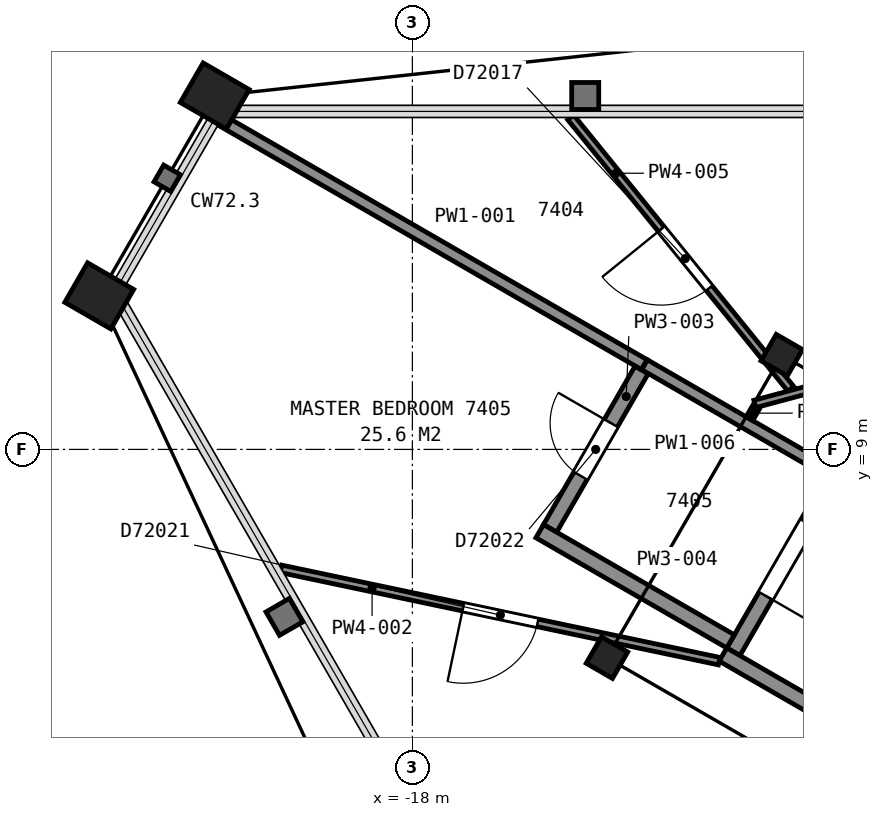
"""IFC4 building model, lengths in metres.
Left out: names, types, materials, properties, quantities, classifications, styles, units other than length and angle.
Written with IfcOpenShell. Run it as: python <this file> out.ifc"""

import sys

from ifc_helpers import new_model, si_unit, direction, frame, frame_2d, origin, origin_2d, place, context, subcontext, project, spatial, rectangle, hollow_rectangle, i_section, extrude, element, fill, save


model = new_model("IFC4")
c1 = context("Model", 3, precision=1e-05, world=origin(), true_north=direction((0.0, 1.0)))
c2 = subcontext(c1, "Body", "Model", "MODEL_VIEW")
j1 = project(units=[si_unit("LENGTHUNIT", "METRE"), si_unit("PLANEANGLEUNIT", "RADIAN")], contexts=[c1])
p1 = place(None, origin())
s1 = spatial("IfcSite", under=j1, at=p1, CompositionType="ELEMENT")
p2 = place(p1, origin())
s2 = spatial("IfcBuilding", under=s1, at=p2, CompositionType="ELEMENT")
p3 = place(p2, frame((0.0, 0.0, 293.6)))
s3 = spatial("IfcBuildingStorey", under=s2, at=p3, CompositionType="ELEMENT", Elevation=293.6)
for number, where, z_axis, x_axis in (
    (1, (-20.6, 13.65, 0.0), (0.0, 0.0, 1.0), (0.5, 0.866, 0.0)),
    (2, (-22.12, 11.02, 0.0), (0.0, 0.0, 1.0), (0.5, 0.866, 0.0)),
):
    element("IfcColumn", number, at=place(p3, frame(where, z_axis=z_axis, x_axis=x_axis)), inside=s3, PredefinedType="COLUMN", context=c2, shape_type="SweptSolid", body=[
        extrude(hollow_rectangle(XDim=0.6, YDim=0.7, WallThickness=0.04, at=origin_2d()), origin(), (0.0, 0.0, 1.0), 3.7),
    ])
for number, where, z_axis, x_axis in (
    (3, (-13.14, 10.24, 0.0), (0.0, 0.0, 1.0), (0.5, 0.866, 0.0)),
    (4, (-15.44, 6.26, 0.0), (0.0, 0.0, 1.0), (0.5, 0.866, 0.0)),
):
    element("IfcColumn", number, at=place(p3, frame(where, z_axis=z_axis, x_axis=x_axis)), inside=s3, PredefinedType="COLUMN", context=c2, shape_type="SweptSolid", body=[
        extrude(i_section(OverallWidth=0.401, OverallDepth=0.399, WebThickness=0.025, FlangeThickness=0.04, FilletRadius=0.015, at=origin_2d()), origin(), (0.0, 0.0, 1.0), 3.7),
    ])
p4 = place(p3, frame((-12.377, 8.762, 0.0), z_axis=(0.0, 0.0, 1.0), x_axis=(-0.500049511043, -0.865996816683, 0.0)))
e5 = element("IfcWall", 5, at=p4, inside=s3, PredefinedType="PARTITIONING", context=c2, shape_type="SweptSolid", body=[
    extrude(rectangle(XDim=2.8, YDim=0.2, at=frame_2d((1.4, 0.0))), origin(), (0.0, 0.0, 1.0), 3.45),
])
p5 = place(p4, frame((0.85, 0.0, 0.0)))
e6 = element("IfcOpeningElement", 6, at=p5, cuts=e5, PredefinedType="OPENING", context=c2, shape_type="SweptSolid", body=[
    extrude(rectangle(XDim=1.1, YDim=2.1, at=frame_2d((0.55, 1.05))), frame((0.0, 0.11, 0.0), z_axis=(0.0, -1.0, 0.0), x_axis=(1.0, 0.0, 0.0)), (0.0, 0.0, 1.0), 0.22),
])
p6 = place(p3, frame((-7.678, 2.701, 0.0), z_axis=(0.0, 0.0, 1.0), x_axis=(-0.866018442252, 0.500012057535, 0.0)))
e7 = element("IfcWall", 7, at=p6, inside=s3, PredefinedType="PARTITIONING", context=c2, shape_type="SweptSolid", body=[
    extrude(rectangle(XDim=7.2, YDim=0.2, at=frame_2d((3.6, 0.0))), origin(), (0.0, 0.0, 1.0), 3.45),
])
p7 = place(p3, frame((-20.506, 13.324, 0.0), z_axis=(0.0, 0.0, 1.0), x_axis=(0.866004971522, -0.500035388047, 0.0)))
e8 = element("IfcWall", 8, at=p7, inside=s3, PredefinedType="PARTITIONING", context=c2, shape_type="SweptSolid", body=[
    extrude(rectangle(XDim=6.416, YDim=0.15, at=frame_2d((3.208, 0.0))), origin(), (0.0, 0.0, 1.0), 2.723),
])
p8 = place(p3, frame((-19.729, 7.428, 0.0), z_axis=(0.0, 0.0, 1.0), x_axis=(0.97852427483, -0.206131617102, 0.0)))
e9 = element("IfcWall", 9, at=p8, inside=s3, PredefinedType="PARTITIONING", context=c2, shape_type="SweptSolid", body=[
    extrude(rectangle(XDim=5.891, YDim=0.1, at=frame_2d((2.946, 0.0))), origin(), (0.0, 0.0, 1.0), 2.723),
])
p9 = place(p8, frame((2.45, 0.0, 0.0)))
e10 = element("IfcOpeningElement", 10, at=p9, cuts=e9, PredefinedType="OPENING", context=c2, shape_type="SweptSolid", body=[
    extrude(rectangle(XDim=1.0, YDim=2.1, at=frame_2d((0.5, 1.05))), frame((0.0, 0.06, 0.0), z_axis=(0.0, -1.0, 0.0), x_axis=(1.0, 0.0, 0.0)), (0.0, 0.0, 1.0), 0.12),
])
p10 = place(p3, frame((-14.985, 10.045, 0.0), z_axis=(0.0, 0.0, 1.0), x_axis=(-0.499903970786, -0.866080839178, 0.0)))
e11 = element("IfcWall", 11, at=p10, inside=s3, PredefinedType="PARTITIONING", context=c2, shape_type="SweptSolid", body=[
    extrude(rectangle(XDim=2.406, YDim=0.2, at=frame_2d((1.203, 0.0))), origin(), (0.0, 0.0, 1.0), 2.723),
])
p11 = place(p10, frame((0.806, 0.0, 0.0)))
e12 = element("IfcOpeningElement", 12, at=p11, cuts=e11, PredefinedType="OPENING", context=c2, shape_type="SweptSolid", body=[
    extrude(rectangle(XDim=0.8, YDim=2.1, at=frame_2d((0.4, 1.05))), frame((0.0, 0.11, 0.0), z_axis=(0.0, -1.0, 0.0), x_axis=(1.0, 0.0, 0.0)), (0.0, 0.0, 1.0), 0.22),
])
p12 = place(p3, frame((-16.325, 7.924, 0.0), z_axis=(0.0, 0.0, 1.0), x_axis=(0.865969617579, -0.500096612097, 0.0)))
e13 = element("IfcWall", 13, at=p12, inside=s3, PredefinedType="PARTITIONING", context=c2, shape_type="SweptSolid", body=[
    extrude(rectangle(XDim=2.899, YDim=0.2, at=frame_2d((1.45, 0.0))), origin(), (0.0, 0.0, 1.0), 2.723),
])
p13 = place(p3, frame((-13.021, 9.797, 0.0), z_axis=(0.0, 0.0, 1.0), x_axis=(-0.629738754572, 0.776806990822, 0.0)))
e14 = element("IfcWall", 14, at=p13, inside=s3, PredefinedType="PARTITIONING", context=c2, shape_type="SweptSolid", body=[
    extrude(rectangle(XDim=4.598, YDim=0.1, at=frame_2d((2.299, 0.0))), origin(), (0.0, 0.0, 1.0), 2.723),
])
p14 = place(p13, frame((1.706, 0.0, 0.0)))
e15 = element("IfcOpeningElement", 15, at=p14, cuts=e14, PredefinedType="OPENING", context=c2, shape_type="SweptSolid", body=[
    extrude(rectangle(XDim=1.0, YDim=2.1, at=frame_2d((0.5, 1.05))), frame((0.0, 0.06, 0.0), z_axis=(0.0, -1.0, 0.0), x_axis=(1.0, 0.0, 0.0)), (0.0, 0.0, 1.0), 0.12),
])
p15 = place(p3, frame((-14.945, 10.114, 0.0), z_axis=(0.0, 0.0, 1.0), x_axis=(0.865969158485, -0.500097407065, 0.0)))
e16 = element("IfcWall", 16, at=p15, inside=s3, PredefinedType="PARTITIONING", context=c2, shape_type="SweptSolid", body=[
    extrude(rectangle(XDim=2.799, YDim=0.15, at=frame_2d((1.4, 0.0))), origin(), (0.0, 0.0, 1.0), 2.723),
])
p16 = place(p3, frame((-13.565, 9.404, 0.0), z_axis=(0.0, 0.0, 1.0), x_axis=(0.500181256421, 0.865920730047, 0.0)))
e17 = element("IfcWall", 17, at=p16, inside=s3, PredefinedType="PARTITIONING", context=c2, shape_type="SweptSolid", body=[
    extrude(rectangle(XDim=0.169, YDim=0.1, at=frame_2d((0.084, 0.0))), origin(), (0.0, 0.0, 1.0), 2.723),
])
p17 = place(p3, frame((-13.494, 9.598, 0.0), z_axis=(0.0, 0.0, 1.0), x_axis=(0.96601104623, 0.258500790254, 0.0)))
e18 = element("IfcWall", 18, at=p17, inside=s3, PredefinedType="PARTITIONING", context=c2, shape_type="SweptSolid", body=[
    extrude(rectangle(XDim=1.867, YDim=0.1, at=frame_2d((0.934, 0.0))), origin(), (0.0, 0.0, 1.0), 2.723),
])
p18 = place(p5, origin())
e19 = element("IfcDoor", 19, at=p18, inside=s3, OperationType="SINGLE_SWING_RIGHT", PredefinedType="DOOR", context=c2, shape_type="SweptSolid", body=[
    extrude(rectangle(XDim=1.1, YDim=2.1, at=frame_2d((0.55, 1.05))), frame((0.0, 0.025, 0.0), z_axis=(0.0, -1.0, 0.0), x_axis=(1.0, 0.0, 0.0)), (0.0, 0.0, 1.0), 0.05),
])
fill(e6, e19)
p19 = place(p9, origin())
e20 = element("IfcDoor", 20, at=p19, inside=s3, OperationType="SINGLE_SWING_LEFT", PredefinedType="DOOR", context=c2, shape_type="SweptSolid", body=[
    extrude(rectangle(XDim=1.0, YDim=2.1, at=frame_2d((0.5, 1.05))), frame((0.0, 0.025, 0.0), z_axis=(0.0, -1.0, 0.0), x_axis=(1.0, 0.0, 0.0)), (0.0, 0.0, 1.0), 0.05),
])
fill(e10, e20)
p20 = place(p11, origin())
e21 = element("IfcDoor", 21, at=p20, inside=s3, OperationType="SINGLE_SWING_LEFT", PredefinedType="DOOR", context=c2, shape_type="SweptSolid", body=[
    extrude(rectangle(XDim=0.8, YDim=2.1, at=frame_2d((0.4, 1.05))), frame((0.0, 0.025, 0.0), z_axis=(0.0, -1.0, 0.0), x_axis=(1.0, 0.0, 0.0)), (0.0, 0.0, 1.0), 0.05),
])
fill(e12, e21)
p21 = place(p14, origin())
e22 = element("IfcDoor", 22, at=p21, inside=s3, OperationType="SINGLE_SWING_RIGHT", PredefinedType="DOOR", context=c2, shape_type="SweptSolid", body=[
    extrude(rectangle(XDim=1.0, YDim=2.1, at=frame_2d((0.5, 1.05))), frame((0.0, 0.025, 0.0), z_axis=(0.0, -1.0, 0.0), x_axis=(1.0, 0.0, 0.0)), (0.0, 0.0, 1.0), 0.05),
])
fill(e15, e22)
save(model, sys.argv[1])
